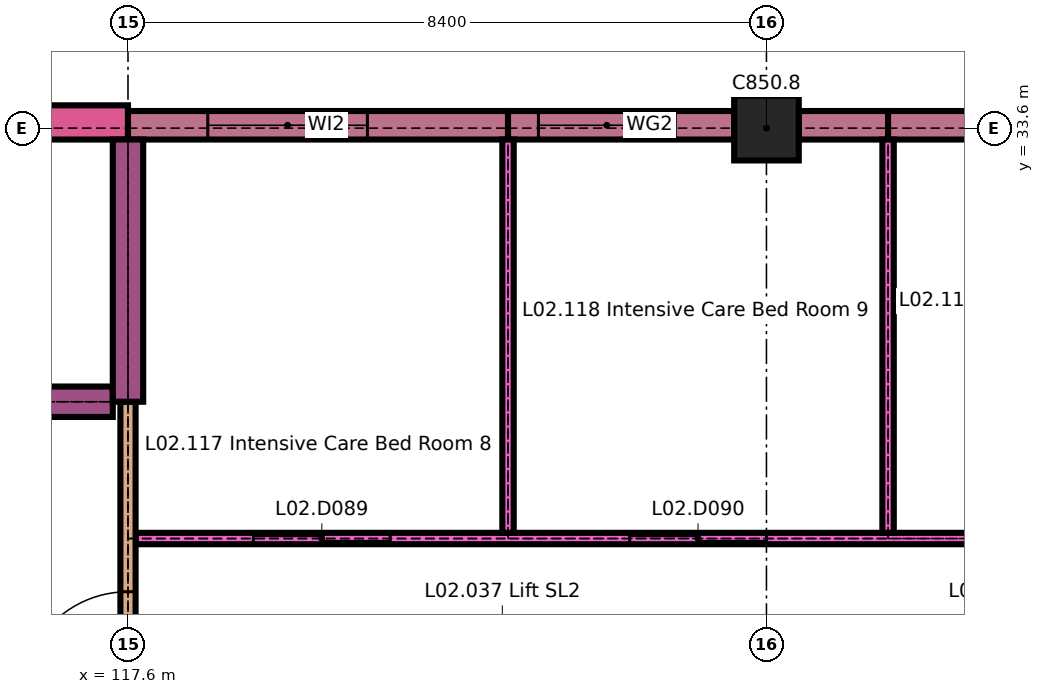
"""IFC4 building model, lengths in metres.
Left out: names, types, materials, properties, quantities, classifications, styles, units other than length and angle.
Written with IfcOpenShell. Run it as: python <this file> out.ifc"""

import sys

from ifc_helpers import new_model, si_unit, direction, frame, frame_2d, origin, origin_2d, place, context, subcontext, project, spatial, rectangle, extrude, element, fill, save


model = new_model("IFC4")
c1 = context("Model", 3, precision=1e-05, world=origin(), true_north=direction((0.0, 1.0)))
c2 = subcontext(c1, "Body", "Model", "MODEL_VIEW")
j1 = project(units=[si_unit("LENGTHUNIT", "METRE"), si_unit("PLANEANGLEUNIT", "RADIAN")], contexts=[c1])
p1 = place(None, origin())
s1 = spatial("IfcSite", under=j1, at=p1, CompositionType="ELEMENT")
p2 = place(p1, origin())
s2 = spatial("IfcBuilding", under=s1, at=p2, CompositionType="ELEMENT")
p3 = place(p2, frame((0.0, 0.0, 8.4)))
s3 = spatial("IfcBuildingStorey", under=s2, at=p3, CompositionType="ELEMENT", Elevation=8.4)
p4 = place(p3, frame((126.0, 33.6, 0.0), z_axis=(0.0, 0.0, 1.0), x_axis=(1.0, 0.0, 0.0)))
e1 = element("IfcColumn", 1, at=p4, inside=s3, PredefinedType="COLUMN", context=c2, shape_type="SweptSolid", body=[
    extrude(rectangle(XDim=0.85, YDim=0.85, at=origin_2d()), origin(), (0.0, 0.0, 1.0), 4.2),
])
p5 = place(p3, frame((113.75, 33.675, 0.0), z_axis=(0.0, 0.0, 1.0), x_axis=(1.0, 0.0, 0.0)))
e2 = element("IfcWall", 2, at=p5, inside=s3, PredefinedType="SOLIDWALL", context=c2, shape_type="SweptSolid", body=[
    extrude(rectangle(XDim=3.85, YDim=0.45, at=frame_2d((1.925, 0.0))), origin(), (0.0, 0.0, 1.0), 4.2),
])
p6 = place(p3, frame((117.6, 33.637, 0.0), z_axis=(0.0, 0.0, 1.0), x_axis=(1.0, 0.0, 0.0)))
e3 = element("IfcWall", 3, at=p6, inside=s3, PredefinedType="SOLIDWALL", context=c2, shape_type="SweptSolid", body=[
    extrude(rectangle(XDim=5.0, YDim=0.375, at=frame_2d((2.5, 0.0))), origin(), (0.0, 0.0, 1.0), 3.9),
])
p7 = place(p6, frame((1.05, 0.0, 0.9)))
e4 = element("IfcOpeningElement", 4, at=p7, cuts=e3, PredefinedType="OPENING", context=c2, shape_type="SweptSolid", body=[
    extrude(rectangle(XDim=2.1, YDim=2.1, at=frame_2d((1.05, 1.05))), frame((0.0, 0.198, 0.0), z_axis=(0.0, -1.0, 0.0), x_axis=(1.0, 0.0, 0.0)), (0.0, 0.0, 1.0), 0.395),
])
p8 = place(p3, frame((122.6, 33.637, 0.0), z_axis=(0.0, 0.0, 1.0), x_axis=(1.0, 0.0, 0.0)))
e5 = element("IfcWall", 5, at=p8, inside=s3, PredefinedType="SOLIDWALL", context=c2, shape_type="SweptSolid", body=[
    extrude(rectangle(XDim=2.975, YDim=0.375, at=frame_2d((1.487, 0.0))), origin(), (0.0, 0.0, 1.0), 3.9),
])
p9 = place(p8, frame((0.4, 0.0, 0.9)))
e6 = element("IfcOpeningElement", 6, at=p9, cuts=e5, PredefinedType="OPENING", context=c2, shape_type="SweptSolid", body=[
    extrude(rectangle(XDim=1.8, YDim=2.1, at=frame_2d((0.9, 1.05))), frame((0.0, 0.198, 0.0), z_axis=(0.0, -1.0, 0.0), x_axis=(1.0, 0.0, 0.0)), (0.0, 0.0, 1.0), 0.395),
])
p10 = place(p3, frame((126.425, 33.637, 0.0), z_axis=(0.0, 0.0, 1.0), x_axis=(1.0, 0.0, 0.0)))
e7 = element("IfcWall", 7, at=p10, inside=s3, PredefinedType="SOLIDWALL", context=c2, shape_type="SweptSolid", body=[
    extrude(rectangle(XDim=1.175, YDim=0.375, at=frame_2d((0.587, 0.0))), origin(), (0.0, 0.0, 1.0), 3.9),
])
p11 = place(p3, frame((127.6, 33.637, 0.0), z_axis=(0.0, 0.0, 1.0), x_axis=(1.0, 0.0, 0.0)))
e8 = element("IfcWall", 8, at=p11, inside=s3, PredefinedType="SOLIDWALL", context=c2, shape_type="SweptSolid", body=[
    extrude(rectangle(XDim=5.0, YDim=0.375, at=frame_2d((2.5, 0.0))), origin(), (0.0, 0.0, 1.0), 3.9),
])
p12 = place(p11, frame((1.45, 0.0, 0.9)))
e9 = element("IfcOpeningElement", 9, at=p12, cuts=e8, PredefinedType="OPENING", context=c2, shape_type="SweptSolid", body=[
    extrude(rectangle(XDim=2.1, YDim=2.1, at=frame_2d((1.05, 1.05))), frame((0.0, 0.198, 0.0), z_axis=(0.0, -1.0, 0.0), x_axis=(1.0, 0.0, 0.0)), (0.0, 0.0, 1.0), 0.395),
])
p13 = place(p3, frame((117.7, 28.2, 0.0), z_axis=(0.0, 0.0, 1.0), x_axis=(1.0, 0.0, 0.0)))
e10 = element("IfcWall", 10, at=p13, inside=s3, PredefinedType="PARTITIONING", context=c2, shape_type="SweptSolid", body=[
    extrude(rectangle(XDim=50.15, YDim=0.15, at=frame_2d((25.075, 0.0))), origin(), (0.0, 0.0, 1.0), 4.2),
])
p14 = place(p13, frame((1.55, 0.0, 0.0)))
e11 = element("IfcOpeningElement", 11, at=p14, cuts=e10, PredefinedType="OPENING", context=c2, shape_type="SweptSolid", body=[
    extrude(rectangle(XDim=1.8, YDim=2.4, at=frame_2d((0.9, 1.2))), frame((0.0, 0.085, 0.0), z_axis=(0.0, -1.0, 0.0), x_axis=(1.0, 0.0, 0.0)), (0.0, 0.0, 1.0), 0.17),
])
p15 = place(p13, frame((6.5, 0.0, 0.0)))
e12 = element("IfcOpeningElement", 12, at=p15, cuts=e10, PredefinedType="OPENING", context=c2, shape_type="SweptSolid", body=[
    extrude(rectangle(XDim=1.8, YDim=2.4, at=frame_2d((0.9, 1.2))), frame((0.0, 0.085, 0.0), z_axis=(0.0, -1.0, 0.0), x_axis=(1.0, 0.0, 0.0)), (0.0, 0.0, 1.0), 0.17),
])
p16 = place(p13, frame((11.5, 0.0, 0.0)))
e13 = element("IfcOpeningElement", 13, at=p16, cuts=e10, PredefinedType="OPENING", context=c2, shape_type="SweptSolid", body=[
    extrude(rectangle(XDim=1.8, YDim=2.4, at=frame_2d((0.9, 1.2))), frame((0.0, 0.085, 0.0), z_axis=(0.0, -1.0, 0.0), x_axis=(1.0, 0.0, 0.0)), (0.0, 0.0, 1.0), 0.17),
])
p17 = place(p13, frame((16.5, 0.0, 0.0)))
e14 = element("IfcOpeningElement", 14, at=p17, cuts=e10, PredefinedType="OPENING", context=c2, shape_type="SweptSolid", body=[
    extrude(rectangle(XDim=1.8, YDim=2.4, at=frame_2d((0.9, 1.2))), frame((0.0, 0.085, 0.0), z_axis=(0.0, -1.0, 0.0), x_axis=(1.0, 0.0, 0.0)), (0.0, 0.0, 1.0), 0.17),
])
p18 = place(p13, frame((21.95, 0.0, 0.0)))
e15 = element("IfcOpeningElement", 15, at=p18, cuts=e10, PredefinedType="OPENING", context=c2, shape_type="SweptSolid", body=[
    extrude(rectangle(XDim=1.1, YDim=2.1, at=frame_2d((0.55, 1.05))), frame((0.0, 0.085, 0.0), z_axis=(0.0, -1.0, 0.0), x_axis=(1.0, 0.0, 0.0)), (0.0, 0.0, 1.0), 0.17),
])
p19 = place(p13, frame((26.7, 0.0, 0.0)))
e16 = element("IfcOpeningElement", 16, at=p19, cuts=e10, PredefinedType="OPENING", context=c2, shape_type="SweptSolid", body=[
    extrude(rectangle(XDim=1.8, YDim=2.4, at=frame_2d((0.9, 1.2))), frame((0.0, 0.085, 0.0), z_axis=(0.0, -1.0, 0.0), x_axis=(1.0, 0.0, 0.0)), (0.0, 0.0, 1.0), 0.17),
])
p20 = place(p13, frame((31.7, 0.0, 0.0)))
e17 = element("IfcOpeningElement", 17, at=p20, cuts=e10, PredefinedType="OPENING", context=c2, shape_type="SweptSolid", body=[
    extrude(rectangle(XDim=1.8, YDim=2.4, at=frame_2d((0.9, 1.2))), frame((0.0, 0.085, 0.0), z_axis=(0.0, -1.0, 0.0), x_axis=(1.0, 0.0, 0.0)), (0.0, 0.0, 1.0), 0.17),
])
p21 = place(p13, frame((36.7, 0.0, 0.0)))
e18 = element("IfcOpeningElement", 18, at=p21, cuts=e10, PredefinedType="OPENING", context=c2, shape_type="SweptSolid", body=[
    extrude(rectangle(XDim=1.8, YDim=2.4, at=frame_2d((0.9, 1.2))), frame((0.0, 0.085, 0.0), z_axis=(0.0, -1.0, 0.0), x_axis=(1.0, 0.0, 0.0)), (0.0, 0.0, 1.0), 0.17),
])
p22 = place(p13, frame((41.7, 0.0, 0.0)))
e19 = element("IfcOpeningElement", 19, at=p22, cuts=e10, PredefinedType="OPENING", context=c2, shape_type="SweptSolid", body=[
    extrude(rectangle(XDim=1.8, YDim=2.4, at=frame_2d((0.9, 1.2))), frame((0.0, 0.085, 0.0), z_axis=(0.0, -1.0, 0.0), x_axis=(1.0, 0.0, 0.0)), (0.0, 0.0, 1.0), 0.17),
])
p23 = place(p13, frame((46.725, 0.0, 0.0)))
e20 = element("IfcOpeningElement", 20, at=p23, cuts=e10, PredefinedType="OPENING", context=c2, shape_type="SweptSolid", body=[
    extrude(rectangle(XDim=1.8, YDim=2.4, at=frame_2d((0.9, 1.2))), frame((0.0, 0.085, 0.0), z_axis=(0.0, -1.0, 0.0), x_axis=(1.0, 0.0, 0.0)), (0.0, 0.0, 1.0), 0.17),
])
p24 = place(p3, frame((109.4, 30.0, 0.0), z_axis=(0.0, 0.0, 1.0), x_axis=(1.0, 0.0, 0.0)))
e21 = element("IfcWall", 21, at=p24, inside=s3, PredefinedType="SHEAR", context=c2, shape_type="SweptSolid", body=[
    extrude(rectangle(XDim=8.0, YDim=0.4, at=frame_2d((4.0, 0.0))), origin(), (0.0, 0.0, 1.0), 4.2),
])
p25 = place(p24, frame((0.4, 0.0, 0.0)))
e22 = element("IfcOpeningElement", 22, at=p25, cuts=e21, PredefinedType="OPENING", context=c2, shape_type="SweptSolid", body=[
    extrude(rectangle(XDim=1.2, YDim=2.1, at=frame_2d((0.6, 1.05))), frame((0.0, 0.21, 0.0), z_axis=(0.0, -1.0, 0.0), x_axis=(1.0, 0.0, 0.0)), (0.0, 0.0, 1.0), 0.42),
])
p26 = place(p3, frame((117.6, 25.4, 0.0), z_axis=(0.0, 0.0, 1.0), x_axis=(0.0, 1.0, 0.0)))
e23 = element("IfcWall", 23, at=p26, inside=s3, PredefinedType="PARTITIONING", context=c2, shape_type="SweptSolid", body=[
    extrude(rectangle(XDim=4.6, YDim=0.2, at=frame_2d((2.3, 0.0))), origin(), (0.0, 0.0, 1.0), 4.2),
])
p27 = place(p26, frame((0.7, 0.0, 0.0)))
e24 = element("IfcOpeningElement", 24, at=p27, cuts=e23, PredefinedType="OPENING", context=c2, shape_type="SweptSolid", body=[
    extrude(rectangle(XDim=1.4, YDim=2.1, at=frame_2d((0.7, 1.05))), frame((0.0, 0.11, 0.0), z_axis=(0.0, -1.0, 0.0), x_axis=(1.0, 0.0, 0.0)), (0.0, 0.0, 1.0), 0.22),
])
p28 = place(p3, frame((117.6, 30.0, 0.0), z_axis=(0.0, 0.0, 1.0), x_axis=(0.0, 1.0, 0.0)))
e25 = element("IfcWall", 25, at=p28, inside=s3, PredefinedType="SHEAR", context=c2, shape_type="SweptSolid", body=[
    extrude(rectangle(XDim=3.45, YDim=0.4, at=frame_2d((1.725, 0.0))), origin(), (0.0, 0.0, 1.0), 4.2),
])
for number, where, z_axis, x_axis in (
    (26, (122.6, 28.275, 0.0), (0.0, 0.0, 1.0), (0.0, 1.0, 0.0)),
    (27, (127.6, 28.275, 0.0), (0.0, 0.0, 1.0), (0.0, 1.0, 0.0)),
):
    element("IfcWall", number, at=place(p3, frame(where, z_axis=z_axis, x_axis=x_axis)), inside=s3, PredefinedType="PARTITIONING", context=c2, shape_type="SweptSolid", body=[
        extrude(rectangle(XDim=5.175, YDim=0.15, at=frame_2d((2.587, 0.0))), origin(), (0.0, 0.0, 1.0), 4.2),
    ])
p29 = place(p7, origin())
e28 = element("IfcWindow", 28, at=p29, inside=s3, PartitioningType="SINGLE_PANEL", PredefinedType="WINDOW", context=c2, shape_type="SweptSolid", body=[
    extrude(rectangle(XDim=2.1, YDim=2.1, at=frame_2d((1.05, 1.05))), frame((0.0, 0.045, 0.0), z_axis=(0.0, -1.0, 0.0), x_axis=(1.0, 0.0, 0.0)), (0.0, 0.0, 1.0), 0.09),
])
fill(e4, e28)
p30 = place(p9, origin())
e29 = element("IfcWindow", 29, at=p30, inside=s3, PartitioningType="DOUBLE_PANEL_VERTICAL", PredefinedType="WINDOW", context=c2, shape_type="SweptSolid", body=[
    extrude(rectangle(XDim=1.8, YDim=2.1, at=frame_2d((0.9, 1.05))), frame((0.0, 0.03, 0.0), z_axis=(0.0, -1.0, 0.0), x_axis=(1.0, 0.0, 0.0)), (0.0, 0.0, 1.0), 0.06),
])
fill(e6, e29)
p31 = place(p14, origin())
e30 = element("IfcDoor", 30, at=p31, inside=s3, OperationType="DOUBLE_DOOR_SLIDING", PredefinedType="DOOR", context=c2, shape_type="SweptSolid", body=[
    extrude(rectangle(XDim=1.8, YDim=2.4, at=frame_2d((0.9, 1.2))), frame((0.0, 0.035, 0.0), z_axis=(0.0, -1.0, 0.0), x_axis=(1.0, 0.0, 0.0)), (0.0, 0.0, 1.0), 0.07),
])
fill(e11, e30)
p32 = place(p15, origin())
e31 = element("IfcDoor", 31, at=p32, inside=s3, OperationType="DOUBLE_DOOR_SLIDING", PredefinedType="DOOR", context=c2, shape_type="SweptSolid", body=[
    extrude(rectangle(XDim=1.8, YDim=2.4, at=frame_2d((0.9, 1.2))), frame((0.0, 0.035, 0.0), z_axis=(0.0, -1.0, 0.0), x_axis=(1.0, 0.0, 0.0)), (0.0, 0.0, 1.0), 0.07),
])
fill(e12, e31)
p33 = place(p27, origin())
e32 = element("IfcDoor", 32, at=p33, inside=s3, OperationType="SINGLE_SWING_RIGHT", PredefinedType="DOOR", context=c2, shape_type="SweptSolid", body=[
    extrude(rectangle(XDim=1.4, YDim=2.1, at=frame_2d((0.7, 1.05))), frame((0.0, 0.03, 0.0), z_axis=(0.0, -1.0, 0.0), x_axis=(1.0, 0.0, 0.0)), (0.0, 0.0, 1.0), 0.06),
])
fill(e24, e32)
save(model, sys.argv[1])
